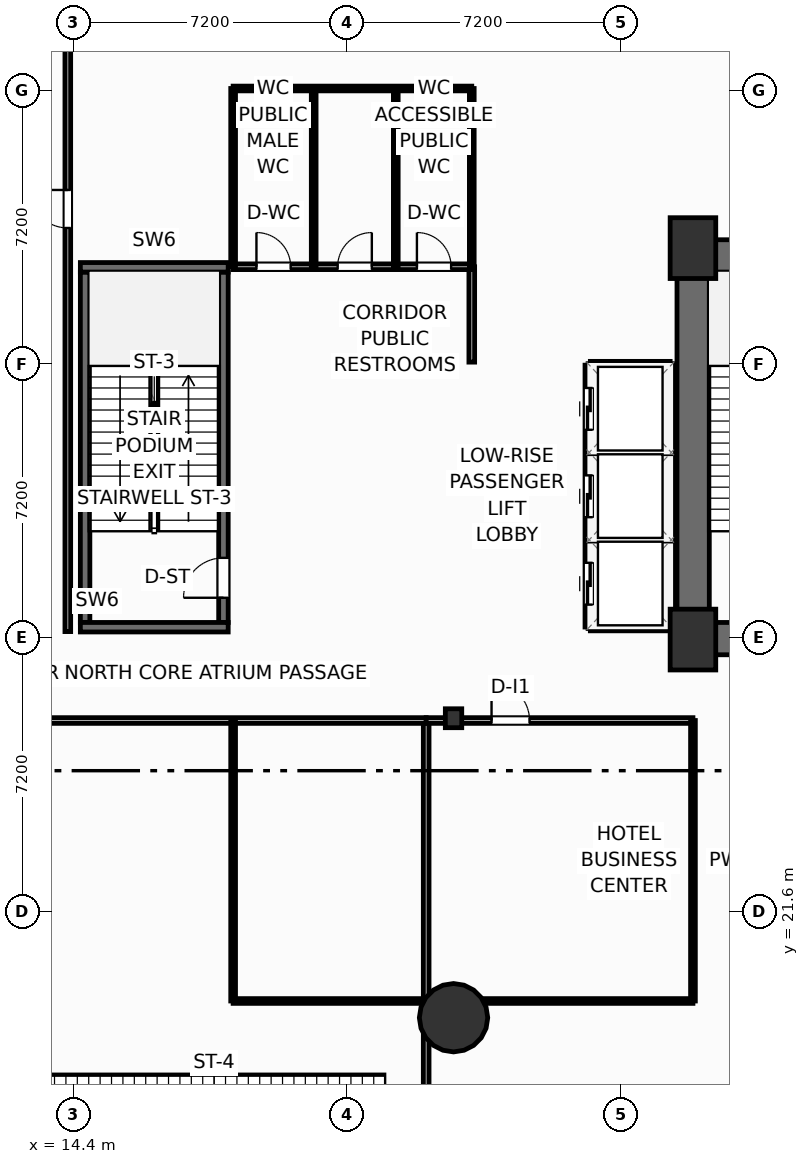
"""IFC4 building model, lengths in metres.
Left out: names, types, materials, properties, quantities, classifications, styles, units other than length and angle.
Written with IfcOpenShell. Run it as: python <this file> out.ifc"""

import sys

from ifc_helpers import new_model, si_unit, direction, frame, frame_2d, origin, origin_2d, place, context, subcontext, project, spatial, rectangle, circle, i_section, extrude, element, fill, save


model = new_model("IFC4")
c1 = context("Model", 3, precision=1e-05, world=origin(), true_north=direction((0.0, 1.0)))
c2 = subcontext(c1, "Body", "Model", "MODEL_VIEW")
j1 = project(units=[si_unit("LENGTHUNIT", "METRE"), si_unit("PLANEANGLEUNIT", "RADIAN")], contexts=[c1])
p1 = place(None, origin())
s1 = spatial("IfcSite", under=j1, at=p1, CompositionType="ELEMENT")
p2 = place(p1, origin())
s2 = spatial("IfcBuilding", under=s1, at=p2, CompositionType="ELEMENT")
p3 = place(p2, frame((0.0, 0.0, 5.4)))
s3 = spatial("IfcBuildingStorey", under=s2, at=p3, CompositionType="ELEMENT", Elevation=5.4)
for number, where, z_axis, x_axis in (
    (1, (30.7, 28.75, 0.0), (0.0, 0.0, 1.0), (1.0, 0.0, 0.0)),
    (2, (30.7, 39.05, 0.0), (0.0, 0.0, 1.0), (1.0, 0.0, 0.0)),
):
    element("IfcColumn", number, at=place(p3, frame(where, z_axis=z_axis, x_axis=x_axis)), inside=s3, PredefinedType="COLUMN", context=c2, shape_type="SweptSolid", body=[
        extrude(rectangle(XDim=1.2, YDim=1.6, at=origin_2d()), origin(), (0.0, 0.0, 1.0), 5.4),
    ])
p4 = place(p3, frame((24.4, 26.68, 0.0), z_axis=(0.0, 0.0, 1.0), x_axis=(1.0, 0.0, 0.0)))
e3 = element("IfcColumn", 3, at=p4, inside=s3, PredefinedType="COLUMN", context=c2, shape_type="SweptSolid", body=[
    extrude(i_section(OverallWidth=0.432, OverallDepth=0.498, WebThickness=0.056, FlangeThickness=0.089, FilletRadius=0.025, at=origin_2d()), origin(), (0.0, 0.0, 1.0), 5.4),
])
p5 = place(p3, frame((30.28, 38.845, 0.0), z_axis=(0.0, 0.0, 1.0), x_axis=(1.0, 0.0, 0.0)))
e4 = element("IfcWall", 4, at=p5, inside=s3, PredefinedType="SHEAR", context=c2, shape_type="SweptSolid", body=[
    extrude(rectangle(XDim=17.84, YDim=0.85, at=frame_2d((8.92, 0.0))), origin(), (0.0, 0.0, 1.0), 5.12),
])
p6 = place(p3, frame((30.705, 29.2, 0.0), z_axis=(0.0, 0.0, 1.0), x_axis=(0.0, 1.0, 0.0)))
e5 = element("IfcWall", 5, at=p6, inside=s3, PredefinedType="SHEAR", context=c2, shape_type="SweptSolid", body=[
    extrude(rectangle(XDim=9.22, YDim=0.85, at=frame_2d((4.61, 0.0))), origin(), (0.0, 0.0, 1.0), 5.12),
])
p7 = place(p3, frame((30.28, 28.775, 0.0), z_axis=(0.0, 0.0, 1.0), x_axis=(1.0, 0.0, 0.0)))
e6 = element("IfcWall", 6, at=p7, inside=s3, PredefinedType="SHEAR", context=c2, shape_type="SweptSolid", body=[
    extrude(rectangle(XDim=4.52, YDim=0.85, at=frame_2d((2.26, 0.0))), origin(), (0.0, 0.0, 1.0), 5.12),
])
p8 = place(p3, frame((14.705, 29.2, 0.0), z_axis=(0.0, 0.0, 1.0), x_axis=(0.0, 1.0, 0.0)))
e7 = element("IfcWall", 7, at=p8, inside=s3, PredefinedType="SHEAR", context=c2, shape_type="SweptSolid", body=[
    extrude(rectangle(XDim=9.22, YDim=0.25, at=frame_2d((4.61, 0.0))), origin(), (0.0, 0.0, 1.0), 5.12),
])
p9 = place(p3, frame((18.345, 29.2, 0.0), z_axis=(0.0, 0.0, 1.0), x_axis=(0.0, 1.0, 0.0)))
e8 = element("IfcWall", 8, at=p9, inside=s3, PredefinedType="SHEAR", context=c2, shape_type="SweptSolid", body=[
    extrude(rectangle(XDim=9.22, YDim=0.25, at=frame_2d((4.61, 0.0))), origin(), (0.0, 0.0, 1.0), 5.12),
])
p10 = place(p9, frame((0.65, 0.0, 0.0)))
e9 = element("IfcOpeningElement", 9, at=p10, cuts=e8, PredefinedType="OPENING", context=c2, shape_type="SweptSolid", body=[
    extrude(rectangle(XDim=1.05, YDim=2.15, at=frame_2d((0.525, 1.075))), frame((0.0, 0.135, 0.0), z_axis=(0.0, -1.0, 0.0), x_axis=(1.0, 0.0, 0.0)), (0.0, 0.0, 1.0), 0.27),
])
for number, where, z_axis, x_axis in (
    (10, (14.58, 38.545, 0.0), (0.0, 0.0, 1.0), (1.0, 0.0, 0.0)),
    (11, (14.58, 29.075, 0.0), (0.0, 0.0, 1.0), (1.0, 0.0, 0.0)),
):
    element("IfcWall", number, at=place(p3, frame(where, z_axis=z_axis, x_axis=x_axis)), inside=s3, PredefinedType="SHEAR", context=c2, shape_type="SweptSolid", body=[
        extrude(rectangle(XDim=3.89, YDim=0.25, at=frame_2d((1.945, 0.0))), origin(), (0.0, 0.0, 1.0), 5.12),
    ])
p11 = place(p3, frame((24.4, 18.8, 0.0), z_axis=(0.0, 0.0, 1.0), x_axis=(1.0, 0.0, 0.0)))
e12 = element("IfcColumn", 12, at=p11, inside=s3, PredefinedType="COLUMN", context=c2, shape_type="SweptSolid", body=[
    extrude(circle(Radius=0.9, at=origin_2d()), origin(), (0.0, 0.0, 1.0), 5.4),
])
p12 = place(p3, frame((24.88, 36.05, 0.0), z_axis=(0.0, 0.0, 1.0), x_axis=(0.0, 1.0, 0.0)))
e13 = element("IfcWall", 13, at=p12, inside=s3, PredefinedType="PARTITIONING", context=c2, shape_type="SweptSolid", body=[
    extrude(rectangle(XDim=2.51, YDim=0.15, at=frame_2d((1.255, 0.0))), origin(), (0.0, 0.0, 1.0), 5.12),
])
p13 = place(p3, frame((18.6, 38.56, 0.0), z_axis=(0.0, 0.0, 1.0), x_axis=(1.0, 0.0, 0.0)))
e14 = element("IfcWall", 14, at=p13, inside=s3, PredefinedType="PARTITIONING", context=c2, shape_type="SweptSolid", body=[
    extrude(rectangle(XDim=6.28, YDim=0.15, at=frame_2d((3.14, 0.0))), origin(), (0.0, 0.0, 1.0), 5.12),
])
p14 = place(p13, frame((0.614, 0.0, 0.0)))
e15 = element("IfcOpeningElement", 15, at=p14, cuts=e14, PredefinedType="OPENING", context=c2, shape_type="SweptSolid", body=[
    extrude(rectangle(XDim=0.9, YDim=2.05, at=frame_2d((0.45, 1.025))), frame((0.0, 0.085, 0.0), z_axis=(0.0, -1.0, 0.0), x_axis=(1.0, 0.0, 0.0)), (0.0, 0.0, 1.0), 0.17),
])
p15 = place(p13, frame((2.75, 0.0, 0.0)))
e16 = element("IfcOpeningElement", 16, at=p15, cuts=e14, PredefinedType="OPENING", context=c2, shape_type="SweptSolid", body=[
    extrude(rectangle(XDim=0.9, YDim=2.05, at=frame_2d((0.45, 1.025))), frame((0.0, 0.085, 0.0), z_axis=(0.0, -1.0, 0.0), x_axis=(1.0, 0.0, 0.0)), (0.0, 0.0, 1.0), 0.17),
])
p16 = place(p13, frame((4.836, 0.0, 0.0)))
e17 = element("IfcOpeningElement", 17, at=p16, cuts=e14, PredefinedType="OPENING", context=c2, shape_type="SweptSolid", body=[
    extrude(rectangle(XDim=0.9, YDim=2.05, at=frame_2d((0.45, 1.025))), frame((0.0, 0.085, 0.0), z_axis=(0.0, -1.0, 0.0), x_axis=(1.0, 0.0, 0.0)), (0.0, 0.0, 1.0), 0.17),
])
for number, where, z_axis, x_axis in (
    (18, (18.6, 38.56, 0.0), (0.0, 0.0, 1.0), (0.0, 1.0, 0.0)),
    (19, (20.72, 38.56, 0.0), (0.0, 0.0, 1.0), (0.0, 1.0, 0.0)),
    (20, (22.88, 38.56, 0.0), (0.0, 0.0, 1.0), (0.0, 1.0, 0.0)),
    (21, (24.88, 38.56, 0.0), (0.0, 0.0, 1.0), (0.0, 1.0, 0.0)),
):
    element("IfcWall", number, at=place(p3, frame(where, z_axis=z_axis, x_axis=x_axis)), inside=s3, PredefinedType="PARTITIONING", context=c2, shape_type="SweptSolid", body=[
        extrude(rectangle(XDim=4.69, YDim=0.125, at=frame_2d((2.345, 0.0))), origin(), (0.0, 0.0, 1.0), 5.12),
    ])
p17 = place(p3, frame((18.6, 43.25, 0.0), z_axis=(0.0, 0.0, 1.0), x_axis=(1.0, 0.0, 0.0)))
e22 = element("IfcWall", 22, at=p17, inside=s3, PredefinedType="PARTITIONING", context=c2, shape_type="SweptSolid", body=[
    extrude(rectangle(XDim=6.28, YDim=0.125, at=frame_2d((3.14, 0.0))), origin(), (0.0, 0.0, 1.0), 5.12),
])
p18 = place(p3, frame((23.68, 0.25, 0.0), z_axis=(0.0, 0.0, 1.0), x_axis=(0.0, 1.0, 0.0)))
e23 = element("IfcWall", 23, at=p18, inside=s3, PredefinedType="PARTITIONING", context=c2, shape_type="SweptSolid", body=[
    extrude(rectangle(XDim=26.37, YDim=0.15, at=frame_2d((13.185, 0.0))), origin(), (0.0, 0.0, 1.0), 5.12),
])
p19 = place(p18, frame((14.514, 0.0, 0.0)))
e24 = element("IfcOpeningElement", 24, at=p19, cuts=e23, PredefinedType="OPENING", context=c2, shape_type="SweptSolid", body=[
    extrude(rectangle(XDim=2.0, YDim=2.05, at=frame_2d((1.0, 1.025))), frame((0.0, 0.085, 0.0), z_axis=(0.0, -1.0, 0.0), x_axis=(1.0, 0.0, 0.0)), (0.0, 0.0, 1.0), 0.17),
])
p20 = place(p3, frame((0.2, 26.62, 0.0), z_axis=(0.0, 0.0, 1.0), x_axis=(1.0, 0.0, 0.0)))
e25 = element("IfcWall", 25, at=p20, inside=s3, PredefinedType="PARTITIONING", context=c2, shape_type="SweptSolid", body=[
    extrude(rectangle(XDim=23.48, YDim=0.15, at=frame_2d((11.74, 0.0))), origin(), (0.0, 0.0, 1.0), 5.12),
])
p21 = place(p3, frame((14.25, 28.96, 0.0), z_axis=(0.0, 0.0, 1.0), x_axis=(0.0, 1.0, 0.0)))
e26 = element("IfcWall", 26, at=p21, inside=s3, PredefinedType="PARTITIONING", context=c2, shape_type="SweptSolid", body=[
    extrude(rectangle(XDim=21.34, YDim=0.15, at=frame_2d((10.67, 0.0))), origin(), (0.0, 0.0, 1.0), 5.12),
])
p22 = place(p21, frame((10.62, 0.0, 0.0)))
e27 = element("IfcOpeningElement", 27, at=p22, cuts=e26, PredefinedType="OPENING", context=c2, shape_type="SweptSolid", body=[
    extrude(rectangle(XDim=1.0, YDim=2.05, at=frame_2d((0.5, 1.025))), frame((0.0, 0.085, 0.0), z_axis=(0.0, -1.0, 0.0), x_axis=(1.0, 0.0, 0.0)), (0.0, 0.0, 1.0), 0.17),
])
p23 = place(p3, frame((23.68, 26.62, 0.0), z_axis=(0.0, 0.0, 1.0), x_axis=(1.0, 0.0, 0.0)))
e28 = element("IfcWall", 28, at=p23, inside=s3, PredefinedType="PARTITIONING", context=c2, shape_type="SweptSolid", body=[
    extrude(rectangle(XDim=7.02, YDim=0.15, at=frame_2d((3.51, 0.0))), origin(), (0.0, 0.0, 1.0), 4.332),
])
p24 = place(p23, frame((1.72, 0.0, 0.0)))
e29 = element("IfcOpeningElement", 29, at=p24, cuts=e28, PredefinedType="OPENING", context=c2, shape_type="SweptSolid", body=[
    extrude(rectangle(XDim=1.0, YDim=2.05, at=frame_2d((0.5, 1.025))), frame((0.0, 0.085, 0.0), z_axis=(0.0, -1.0, 0.0), x_axis=(1.0, 0.0, 0.0)), (0.0, 0.0, 1.0), 0.17),
])
p25 = place(p3, frame((30.7, 19.24, 0.0), z_axis=(0.0, 0.0, 1.0), x_axis=(0.0, 1.0, 0.0)))
e30 = element("IfcWall", 30, at=p25, inside=s3, PredefinedType="PARTITIONING", context=c2, shape_type="SweptSolid", body=[
    extrude(rectangle(XDim=7.38, YDim=0.125, at=frame_2d((3.69, 0.0))), origin(), (0.0, 0.0, 1.0), 5.12),
])
p26 = place(p3, frame((18.6, 19.24, 0.0), z_axis=(0.0, 0.0, 1.0), x_axis=(0.0, 1.0, 0.0)))
e31 = element("IfcWall", 31, at=p26, inside=s3, PredefinedType="PARTITIONING", context=c2, shape_type="SweptSolid", body=[
    extrude(rectangle(XDim=7.34, YDim=0.125, at=frame_2d((3.67, 0.0))), origin(), (0.0, 0.0, 1.0), 5.12),
])
p27 = place(p3, frame((18.6, 19.24, 0.0), z_axis=(0.0, 0.0, 1.0), x_axis=(1.0, 0.0, 0.0)))
e32 = element("IfcWall", 32, at=p27, inside=s3, PredefinedType="PARTITIONING", context=c2, shape_type="SweptSolid", body=[
    extrude(rectangle(XDim=12.1, YDim=0.125, at=frame_2d((6.05, 0.0))), origin(), (0.0, 0.0, 1.0), 4.332),
])
for number, where, z_axis, x_axis in (
    (33, (28.02, 31.375, 0.0), (0.0, 0.0, 1.0), (1.0, 0.0, 0.0)),
    (34, (28.02, 33.675, 0.0), (0.0, 0.0, 1.0), (1.0, 0.0, 0.0)),
):
    element("IfcWall", number, at=place(p3, frame(where, z_axis=z_axis, x_axis=x_axis)), inside=s3, PredefinedType="PARTITIONING", context=c2, shape_type="SweptSolid", body=[
        extrude(rectangle(XDim=2.06, YDim=0.2, at=frame_2d((1.03, 0.0))), origin(), (0.0, 0.0, 1.0), 5.12),
    ])
for number, where, z_axis, x_axis in (
    (35, (28.0, 29.08, 0.0), (0.0, 0.0, 1.0), (1.0, 0.0, 0.0)),
    (36, (28.0, 35.97, 0.0), (0.0, 0.0, 1.0), (1.0, 0.0, 0.0)),
):
    element("IfcWall", number, at=place(p3, frame(where, z_axis=z_axis, x_axis=x_axis)), inside=s3, PredefinedType="PARTITIONING", context=c2, shape_type="SweptSolid", body=[
        extrude(rectangle(XDim=2.1, YDim=0.2, at=frame_2d((1.05, 0.0))), origin(), (0.0, 0.0, 1.0), 5.12),
    ])
p28 = place(p3, frame((30.12, 29.08, 0.0), z_axis=(0.0, 0.0, 1.0), x_axis=(0.0, 1.0, 0.0)))
e37 = element("IfcWall", 37, at=p28, inside=s3, PredefinedType="PARTITIONING", context=c2, shape_type="SweptSolid", body=[
    extrude(rectangle(XDim=6.89, YDim=0.2, at=frame_2d((3.445, 0.0))), origin(), (0.0, 0.0, 1.0), 5.12),
])
p29 = place(p3, frame((27.96, 29.08, 0.0), z_axis=(0.0, 0.0, 1.0), x_axis=(0.0, 1.0, 0.0)))
e38 = element("IfcWall", 38, at=p29, inside=s3, PredefinedType="PARTITIONING", context=c2, shape_type="SweptSolid", body=[
    extrude(rectangle(XDim=6.89, YDim=0.2, at=frame_2d((3.445, 0.0))), origin(), (0.0, 0.0, 1.0), 5.12),
])
p30 = place(p29, frame((0.59, 0.0, 0.0)))
e39 = element("IfcOpeningElement", 39, at=p30, cuts=e38, PredefinedType="OPENING", context=c2, shape_type="SweptSolid", body=[
    extrude(rectangle(XDim=1.1, YDim=2.15, at=frame_2d((0.55, 1.075))), frame((0.0, 0.11, 0.0), z_axis=(0.0, -1.0, 0.0), x_axis=(1.0, 0.0, 0.0)), (0.0, 0.0, 1.0), 0.22),
])
p31 = place(p29, frame((2.89, 0.0, 0.0)))
e40 = element("IfcOpeningElement", 40, at=p31, cuts=e38, PredefinedType="OPENING", context=c2, shape_type="SweptSolid", body=[
    extrude(rectangle(XDim=1.1, YDim=2.15, at=frame_2d((0.55, 1.075))), frame((0.0, 0.11, 0.0), z_axis=(0.0, -1.0, 0.0), x_axis=(1.0, 0.0, 0.0)), (0.0, 0.0, 1.0), 0.22),
])
p32 = place(p29, frame((5.19, 0.0, 0.0)))
e41 = element("IfcOpeningElement", 41, at=p32, cuts=e38, PredefinedType="OPENING", context=c2, shape_type="SweptSolid", body=[
    extrude(rectangle(XDim=1.1, YDim=2.15, at=frame_2d((0.55, 1.075))), frame((0.0, 0.11, 0.0), z_axis=(0.0, -1.0, 0.0), x_axis=(1.0, 0.0, 0.0)), (0.0, 0.0, 1.0), 0.22),
])
p33 = place(p14, origin())
e42 = element("IfcDoor", 42, at=p33, inside=s3, OperationType="SINGLE_SWING_LEFT", PredefinedType="DOOR", context=c2, shape_type="SweptSolid", body=[
    extrude(rectangle(XDim=0.9, YDim=2.05, at=frame_2d((0.45, 1.025))), frame((0.0, 0.025, 0.0), z_axis=(0.0, -1.0, 0.0), x_axis=(1.0, 0.0, 0.0)), (0.0, 0.0, 1.0), 0.05),
])
fill(e15, e42)
p34 = place(p15, origin())
e43 = element("IfcDoor", 43, at=p34, inside=s3, OperationType="SINGLE_SWING_RIGHT", PredefinedType="DOOR", context=c2, shape_type="SweptSolid", body=[
    extrude(rectangle(XDim=0.9, YDim=2.05, at=frame_2d((0.45, 1.025))), frame((0.0, 0.025, 0.0), z_axis=(0.0, -1.0, 0.0), x_axis=(1.0, 0.0, 0.0)), (0.0, 0.0, 1.0), 0.05),
])
fill(e16, e43)
p35 = place(p16, origin())
e44 = element("IfcDoor", 44, at=p35, inside=s3, OperationType="SINGLE_SWING_LEFT", PredefinedType="DOOR", context=c2, shape_type="SweptSolid", body=[
    extrude(rectangle(XDim=0.9, YDim=2.05, at=frame_2d((0.45, 1.025))), frame((0.0, 0.025, 0.0), z_axis=(0.0, -1.0, 0.0), x_axis=(1.0, 0.0, 0.0)), (0.0, 0.0, 1.0), 0.05),
])
fill(e17, e44)
p36 = place(p22, origin())
e45 = element("IfcDoor", 45, at=p36, inside=s3, OperationType="SINGLE_SWING_RIGHT", PredefinedType="DOOR", context=c2, shape_type="SweptSolid", body=[
    extrude(rectangle(XDim=1.0, YDim=2.05, at=frame_2d((0.5, 1.025))), frame((0.0, 0.025, 0.0), z_axis=(0.0, -1.0, 0.0), x_axis=(1.0, 0.0, 0.0)), (0.0, 0.0, 1.0), 0.05),
])
fill(e27, e45)
p37 = place(p24, origin())
e46 = element("IfcDoor", 46, at=p37, inside=s3, OperationType="SINGLE_SWING_LEFT", PredefinedType="DOOR", context=c2, shape_type="SweptSolid", body=[
    extrude(rectangle(XDim=1.0, YDim=2.05, at=frame_2d((0.5, 1.025))), frame((0.0, 0.025, 0.0), z_axis=(0.0, -1.0, 0.0), x_axis=(1.0, 0.0, 0.0)), (0.0, 0.0, 1.0), 0.05),
])
fill(e29, e46)
p38 = place(p10, origin())
e47 = element("IfcDoor", 47, at=p38, inside=s3, OperationType="SINGLE_SWING_LEFT", PredefinedType="DOOR", context=c2, shape_type="SweptSolid", body=[
    extrude(rectangle(XDim=1.05, YDim=2.15, at=frame_2d((0.525, 1.075))), frame((0.0, 0.025, 0.0), z_axis=(0.0, -1.0, 0.0), x_axis=(1.0, 0.0, 0.0)), (0.0, 0.0, 1.0), 0.05),
])
fill(e9, e47)
p39 = place(p30, origin())
e48 = element("IfcDoor", 48, at=p39, inside=s3, OperationType="SLIDING_TO_LEFT", PredefinedType="DOOR", context=c2, shape_type="SweptSolid", body=[
    extrude(rectangle(XDim=1.1, YDim=2.15, at=frame_2d((0.55, 1.075))), frame((0.0, 0.025, 0.0), z_axis=(0.0, -1.0, 0.0), x_axis=(1.0, 0.0, 0.0)), (0.0, 0.0, 1.0), 0.05),
])
fill(e39, e48)
p40 = place(p31, origin())
e49 = element("IfcDoor", 49, at=p40, inside=s3, OperationType="SLIDING_TO_LEFT", PredefinedType="DOOR", context=c2, shape_type="SweptSolid", body=[
    extrude(rectangle(XDim=1.1, YDim=2.15, at=frame_2d((0.55, 1.075))), frame((0.0, 0.025, 0.0), z_axis=(0.0, -1.0, 0.0), x_axis=(1.0, 0.0, 0.0)), (0.0, 0.0, 1.0), 0.05),
])
fill(e40, e49)
p41 = place(p32, origin())
e50 = element("IfcDoor", 50, at=p41, inside=s3, OperationType="SLIDING_TO_LEFT", PredefinedType="DOOR", context=c2, shape_type="SweptSolid", body=[
    extrude(rectangle(XDim=1.1, YDim=2.15, at=frame_2d((0.55, 1.075))), frame((0.0, 0.025, 0.0), z_axis=(0.0, -1.0, 0.0), x_axis=(1.0, 0.0, 0.0)), (0.0, 0.0, 1.0), 0.05),
])
fill(e41, e50)
save(model, sys.argv[1])
